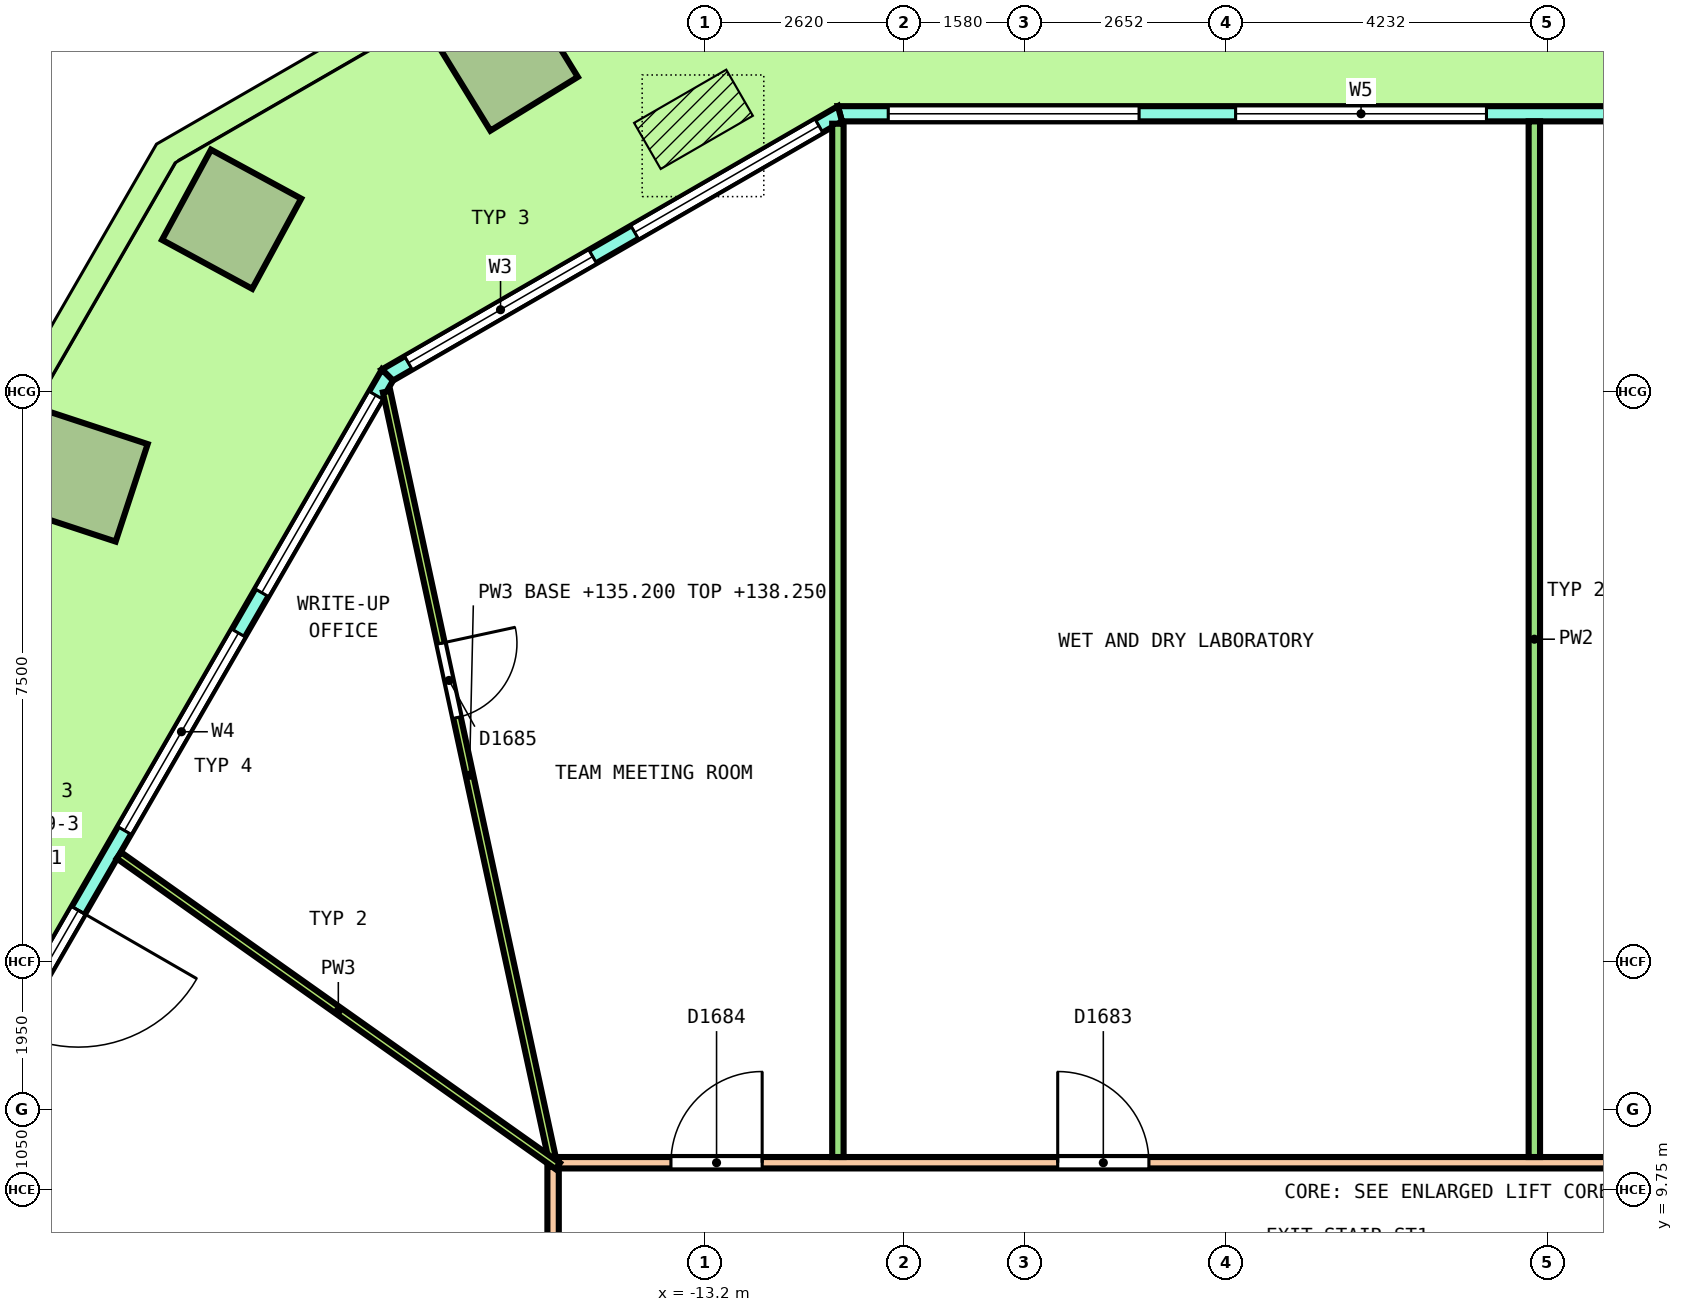
"""IFC4 building model, lengths in metres.
Left out: names, types, materials, properties, quantities, classifications, styles, units other than length and angle.
Written with IfcOpenShell. Run it as: python <this file> out.ifc"""

import sys

from ifc_helpers import new_model, si_unit, direction, frame, frame_2d, origin, origin_2d, place, context, subcontext, project, spatial, polyline, rectangle, outline, extrude, element, fill, save


model = new_model("IFC4")
c1 = context("Model", 3, precision=1e-05, world=origin(), true_north=direction((0.0, 1.0)))
c2 = subcontext(c1, "Body", "Model", "MODEL_VIEW")
j1 = project(units=[si_unit("LENGTHUNIT", "METRE"), si_unit("PLANEANGLEUNIT", "RADIAN")], contexts=[c1])
p1 = place(None, origin())
s1 = spatial("IfcSite", under=j1, at=p1, CompositionType="ELEMENT")
p2 = place(p1, origin())
s2 = spatial("IfcBuilding", under=s1, at=p2, CompositionType="ELEMENT")
p3 = place(p2, frame((0.0, 0.0, 135.2)))
s3 = spatial("IfcBuildingStorey", under=s2, at=p3, CompositionType="ELEMENT", Elevation=135.2)
for number, where, z_axis, x_axis in (
    (1, (-15.803, 24.606, 0.0), (0.341, 0.0, 0.94), (-0.801, -0.523, 0.291)),
    (2, (-19.43, 22.512, 0.0), (0.341, 0.0, 0.94), (-0.448, -0.879, 0.163)),
):
    element("IfcColumn", number, at=place(p3, frame(where, z_axis=z_axis, x_axis=x_axis)), inside=s3, PredefinedType="COLUMN", context=c2, shape_type="SweptSolid", body=[
        extrude(rectangle(XDim=1.35, YDim=1.35, at=origin_2d()), origin(), (0.0, 0.0, 1.0), 4.298),
    ])
p4 = place(p3, frame((-21.386, 19.124, 0.0), z_axis=(0.309930766279, -0.059635152069, 0.948887015799), x_axis=(-0.470498954611, -0.8768780975, 0.098567417711)))
e3 = element("IfcColumn", 3, at=p4, inside=s3, PredefinedType="COLUMN", context=c2, shape_type="SweptSolid", body=[
    extrude(rectangle(XDim=1.35, YDim=1.35, at=origin_2d()), origin(), (0.0, 0.0, 1.0), 4.258),
])
p5 = place(p3, frame((-23.342, 15.736, 0.0), z_axis=(0.276787116882, -0.119841216302, 0.953429061233), x_axis=(-0.49068194142, -0.870713478182, 0.033004109981)))
e4 = element("IfcColumn", 4, at=p5, inside=s3, PredefinedType="COLUMN", context=c2, shape_type="SweptSolid", body=[
    extrude(rectangle(XDim=1.35, YDim=1.35, at=origin_2d()), origin(), (0.0, 0.0, 1.0), 4.237),
])
p6 = place(p3, frame((11.426, 23.9, 0.0), z_axis=(0.0, 0.0, 1.0), x_axis=(-1.0, 0.0, 0.0)))
e5 = element("IfcWall", 5, at=p6, inside=s3, PredefinedType="SOLIDWALL", context=c2, shape_type="SweptSolid", body=[
    extrude(outline(polyline([(-0.027, -0.1), (1.014, -0.1), (2.055, -0.1), (3.097, -0.1), (4.138, -0.1), (5.179, -0.1), (6.22, -0.1), (7.261, -0.1), (8.303, -0.1), (9.344, -0.1), (10.385, -0.1), (11.426, -0.1), (12.468, -0.1), (13.509, -0.1), (14.55, -0.1), (15.591, -0.1), (16.632, -0.1), (17.673, -0.1), (18.715, -0.1), (19.756, -0.1), (20.797, -0.1), (21.838, -0.1), (22.879, -0.1), (22.826, 0.1), (21.789, 0.1), (20.753, 0.1), (19.717, 0.1), (18.68, 0.1), (17.644, 0.1), (16.608, 0.1), (15.572, 0.1), (14.535, 0.1), (13.499, 0.1), (12.463, 0.1), (11.426, 0.1), (10.39, 0.1), (9.354, 0.1), (8.317, 0.1), (7.281, 0.1), (6.245, 0.1), (5.208, 0.1), (4.172, 0.1), (3.136, 0.1), (2.099, 0.1), (1.063, 0.1), (0.027, 0.1), (-0.027, -0.1)])), origin(), (0.0, 0.0, 1.0), 4.1),
])
p7 = place(p6, frame((0.635, 0.0, 0.1)))
e6 = element("IfcOpeningElement", 6, at=p7, cuts=e5, PredefinedType="OPENING", context=c2, shape_type="SweptSolid", body=[
    extrude(rectangle(XDim=3.3, YDim=2.9, at=frame_2d((1.65, 1.45))), frame((0.0, 0.11, 0.0), z_axis=(0.0, -1.0, 0.0), x_axis=(1.0, 0.0, 0.0)), (0.0, 0.0, 1.0), 0.22),
])
p8 = place(p6, frame((5.206, 0.0, 0.1)))
e7 = element("IfcOpeningElement", 7, at=p8, cuts=e5, PredefinedType="OPENING", context=c2, shape_type="SweptSolid", body=[
    extrude(rectangle(XDim=3.3, YDim=2.9, at=frame_2d((1.65, 1.45))), frame((0.0, 0.11, 0.0), z_axis=(0.0, -1.0, 0.0), x_axis=(1.0, 0.0, 0.0)), (0.0, 0.0, 1.0), 0.22),
])
p9 = place(p6, frame((10.526, 0.0, 0.0)))
e8 = element("IfcOpeningElement", 8, at=p9, cuts=e5, PredefinedType="OPENING", context=c2, shape_type="SweptSolid", body=[
    extrude(rectangle(XDim=1.8, YDim=2.4, at=frame_2d((0.9, 1.2))), frame((0.0, 0.11, 0.0), z_axis=(0.0, -1.0, 0.0), x_axis=(1.0, 0.0, 0.0)), (0.0, 0.0, 1.0), 0.22),
])
p10 = place(p6, frame((10.526, 0.0, 2.55)))
e9 = element("IfcOpeningElement", 9, at=p10, cuts=e5, PredefinedType="OPENING", context=c2, shape_type="SweptSolid", body=[
    extrude(rectangle(XDim=1.8, YDim=0.45, at=frame_2d((0.9, 0.225))), frame((0.0, 0.11, 0.0), z_axis=(0.0, -1.0, 0.0), x_axis=(1.0, 0.0, 0.0)), (0.0, 0.0, 1.0), 0.22),
])
p11 = place(p6, frame((14.347, 0.0, 0.1)))
e10 = element("IfcOpeningElement", 10, at=p11, cuts=e5, PredefinedType="OPENING", context=c2, shape_type="SweptSolid", body=[
    extrude(rectangle(XDim=3.3, YDim=2.9, at=frame_2d((1.65, 1.45))), frame((0.0, 0.11, 0.0), z_axis=(0.0, -1.0, 0.0), x_axis=(1.0, 0.0, 0.0)), (0.0, 0.0, 1.0), 0.22),
])
p12 = place(p6, frame((18.917, 0.0, 0.1)))
e11 = element("IfcOpeningElement", 11, at=p12, cuts=e5, PredefinedType="OPENING", context=c2, shape_type="SweptSolid", body=[
    extrude(rectangle(XDim=3.3, YDim=2.9, at=frame_2d((1.65, 1.45))), frame((0.0, 0.11, 0.0), z_axis=(0.0, -1.0, 0.0), x_axis=(1.0, 0.0, 0.0)), (0.0, 0.0, 1.0), 0.22),
])
p13 = place(p3, frame((-11.426, 23.9, 0.0), z_axis=(0.0, 0.0, 1.0), x_axis=(-0.866029458321, -0.49999297727, 0.0)))
e12 = element("IfcWall", 12, at=p13, inside=s3, PredefinedType="SOLIDWALL", context=c2, shape_type="SweptSolid", body=[
    extrude(outline(polyline([(-0.027, -0.1), (1.128, -0.1), (2.282, -0.1), (3.437, -0.1), (4.592, -0.1), (5.747, -0.1), (6.901, -0.1), (6.848, 0.1), (5.711, 0.1), (4.574, 0.1), (3.437, 0.1), (2.301, 0.1), (1.164, 0.1), (0.027, 0.1), (-0.027, -0.1)])), origin(), (0.0, 0.0, 1.0), 4.1),
])
p14 = place(p13, frame((0.319, 0.0, 0.1)))
e13 = element("IfcOpeningElement", 13, at=p14, cuts=e12, PredefinedType="OPENING", context=c2, shape_type="SweptSolid", body=[
    extrude(rectangle(XDim=2.8, YDim=2.9, at=frame_2d((1.4, 1.45))), frame((0.0, 0.11, 0.0), z_axis=(0.0, -1.0, 0.0), x_axis=(1.0, 0.0, 0.0)), (0.0, 0.0, 1.0), 0.22),
])
p15 = place(p13, frame((3.756, 0.0, 0.1)))
e14 = element("IfcOpeningElement", 14, at=p15, cuts=e12, PredefinedType="OPENING", context=c2, shape_type="SweptSolid", body=[
    extrude(rectangle(XDim=2.8, YDim=2.9, at=frame_2d((1.4, 1.45))), frame((0.0, 0.11, 0.0), z_axis=(0.0, -1.0, 0.0), x_axis=(1.0, 0.0, 0.0)), (0.0, 0.0, 1.0), 0.22),
])
p16 = place(p3, frame((-17.38, 20.463, 0.0), z_axis=(0.0, 0.0, 1.0), x_axis=(-0.500000137386, -0.866025324465, 0.0)))
e15 = element("IfcWall", 15, at=p16, inside=s3, PredefinedType="SOLIDWALL", context=c2, shape_type="SweptSolid", body=[
    extrude(outline(polyline([(-0.027, -0.1), (0.979, -0.1), (1.986, -0.1), (2.992, -0.1), (3.999, -0.1), (5.005, -0.1), (6.012, -0.1), (7.018, -0.1), (8.025, -0.1), (9.031, -0.1), (10.038, -0.1), (11.044, -0.1), (12.051, -0.1), (13.057, -0.1), (14.063, -0.1), (15.07, -0.1), (16.076, -0.1), (17.083, -0.1), (18.089, -0.1), (18.036, 0.1), (17.035, 0.1), (16.035, 0.1), (15.034, 0.1), (14.034, 0.1), (13.033, 0.1), (12.033, 0.1), (11.032, 0.1), (10.032, 0.1), (9.031, 0.1), (8.031, 0.1), (7.03, 0.1), (6.03, 0.1), (5.029, 0.1), (4.029, 0.1), (3.028, 0.1), (2.028, 0.1), (1.027, 0.1), (0.027, 0.1), (-0.027, -0.1)])), origin(), (0.0, 0.0, 1.0), 4.1),
])
p17 = place(p16, frame((0.306, 0.0, 0.1)))
e16 = element("IfcOpeningElement", 16, at=p17, cuts=e15, PredefinedType="OPENING", context=c2, shape_type="SweptSolid", body=[
    extrude(rectangle(XDim=3.0, YDim=2.9, at=frame_2d((1.5, 1.45))), frame((0.0, 0.11, 0.0), z_axis=(0.0, -1.0, 0.0), x_axis=(1.0, 0.0, 0.0)), (0.0, 0.0, 1.0), 0.22),
])
p18 = place(p16, frame((3.919, 0.0, 0.1)))
e17 = element("IfcOpeningElement", 17, at=p18, cuts=e15, PredefinedType="OPENING", context=c2, shape_type="SweptSolid", body=[
    extrude(rectangle(XDim=3.0, YDim=2.9, at=frame_2d((1.5, 1.45))), frame((0.0, 0.11, 0.0), z_axis=(0.0, -1.0, 0.0), x_axis=(1.0, 0.0, 0.0)), (0.0, 0.0, 1.0), 0.22),
])
p19 = place(p16, frame((8.131, 0.0, 0.0)))
e18 = element("IfcOpeningElement", 18, at=p19, cuts=e15, PredefinedType="OPENING", context=c2, shape_type="SweptSolid", body=[
    extrude(rectangle(XDim=1.8, YDim=2.4, at=frame_2d((0.9, 1.2))), frame((0.0, 0.11, 0.0), z_axis=(0.0, -1.0, 0.0), x_axis=(1.0, 0.0, 0.0)), (0.0, 0.0, 1.0), 0.22),
])
p20 = place(p16, frame((8.131, 0.0, 2.55)))
e19 = element("IfcOpeningElement", 19, at=p20, cuts=e15, PredefinedType="OPENING", context=c2, shape_type="SweptSolid", body=[
    extrude(rectangle(XDim=1.8, YDim=0.45, at=frame_2d((0.9, 0.225))), frame((0.0, 0.11, 0.0), z_axis=(0.0, -1.0, 0.0), x_axis=(1.0, 0.0, 0.0)), (0.0, 0.0, 1.0), 0.22),
])
p21 = place(p16, frame((11.144, 0.0, 0.1)))
e20 = element("IfcOpeningElement", 20, at=p21, cuts=e15, PredefinedType="OPENING", context=c2, shape_type="SweptSolid", body=[
    extrude(rectangle(XDim=3.0, YDim=2.9, at=frame_2d((1.5, 1.45))), frame((0.0, 0.11, 0.0), z_axis=(0.0, -1.0, 0.0), x_axis=(1.0, 0.0, 0.0)), (0.0, 0.0, 1.0), 0.22),
])
p22 = place(p16, frame((14.756, 0.0, 0.1)))
e21 = element("IfcOpeningElement", 21, at=p22, cuts=e15, PredefinedType="OPENING", context=c2, shape_type="SweptSolid", body=[
    extrude(rectangle(XDim=3.0, YDim=2.9, at=frame_2d((1.5, 1.45))), frame((0.0, 0.11, 0.0), z_axis=(0.0, -1.0, 0.0), x_axis=(1.0, 0.0, 0.0)), (0.0, 0.0, 1.0), 0.22),
])
p23 = place(p3, frame((-15.125, 10.1, 0.0), z_axis=(0.0, 0.0, 1.0), x_axis=(1.0, 0.0, 0.0)))
e22 = element("IfcWall", 22, at=p23, inside=s3, PredefinedType="PARTITIONING", context=c2, shape_type="SweptSolid", body=[
    extrude(rectangle(XDim=30.25, YDim=0.15, at=frame_2d((15.125, 0.0))), origin(), (0.0, 0.0, 1.0), 3.05),
])
p24 = place(p23, frame((16.895, 0.0, 0.0)))
e23 = element("IfcOpeningElement", 23, at=p24, cuts=e22, PredefinedType="OPENING", context=c2, shape_type="SweptSolid", body=[
    extrude(rectangle(XDim=1.2, YDim=2.1, at=frame_2d((0.6, 1.05))), frame((0.0, 0.085, 0.0), z_axis=(0.0, -1.0, 0.0), x_axis=(1.0, 0.0, 0.0)), (0.0, 0.0, 1.0), 0.17),
])
p25 = place(p23, frame((6.564, 0.0, 0.0)))
e24 = element("IfcOpeningElement", 24, at=p25, cuts=e22, PredefinedType="OPENING", context=c2, shape_type="SweptSolid", body=[
    extrude(rectangle(XDim=1.2, YDim=2.1, at=frame_2d((0.6, 1.05))), frame((0.0, 0.085, 0.0), z_axis=(0.0, -1.0, 0.0), x_axis=(1.0, 0.0, 0.0)), (0.0, 0.0, 1.0), 0.17),
])
p26 = place(p23, frame((1.476, 0.0, 0.0)))
e25 = element("IfcOpeningElement", 25, at=p26, cuts=e22, PredefinedType="OPENING", context=c2, shape_type="SweptSolid", body=[
    extrude(rectangle(XDim=1.2, YDim=2.1, at=frame_2d((0.6, 1.05))), frame((0.0, 0.085, 0.0), z_axis=(0.0, -1.0, 0.0), x_axis=(1.0, 0.0, 0.0)), (0.0, 0.0, 1.0), 0.17),
])
p27 = place(p3, frame((-15.2, 0.426, 0.0), z_axis=(0.0, 0.0, 1.0), x_axis=(0.0, 1.0, 0.0)))
e26 = element("IfcWall", 26, at=p27, inside=s3, PredefinedType="PARTITIONING", context=c2, shape_type="SweptSolid", body=[
    extrude(rectangle(XDim=9.624, YDim=0.15, at=frame_2d((4.812, 0.0))), origin(), (0.0, 0.0, 1.0), 3.05),
])
p28 = place(p27, frame((6.951, 0.0, 0.0)))
e27 = element("IfcOpeningElement", 27, at=p28, cuts=e26, PredefinedType="OPENING", context=c2, shape_type="SweptSolid", body=[
    extrude(rectangle(XDim=1.2, YDim=2.1, at=frame_2d((0.6, 1.05))), frame((0.0, 0.085, 0.0), z_axis=(0.0, -1.0, 0.0), x_axis=(1.0, 0.0, 0.0)), (0.0, 0.0, 1.0), 0.17),
])
p29 = place(p3, frame((-2.291, 10.175, 0.0), z_axis=(0.0, 0.0, 1.0), x_axis=(0.0, 1.0, 0.0)))
e28 = element("IfcWall", 28, at=p29, inside=s3, PredefinedType="PARTITIONING", context=c2, shape_type="SweptSolid", body=[
    extrude(rectangle(XDim=13.625, YDim=0.15, at=frame_2d((6.812, 0.0))), origin(), (0.0, 0.0, 1.0), 3.05),
])
p30 = place(p3, frame((-11.453, 10.175, 0.0), z_axis=(0.0, 0.0, 1.0), x_axis=(0.0, 1.0, 0.0)))
e29 = element("IfcWall", 29, at=p30, inside=s3, PredefinedType="PARTITIONING", context=c2, shape_type="SweptSolid", body=[
    extrude(rectangle(XDim=13.594, YDim=0.15, at=frame_2d((6.797, 0.0))), origin(), (0.0, 0.0, 1.0), 3.05),
])
p31 = place(p3, frame((-17.39, 20.245, 0.0), z_axis=(0.0, 0.0, 1.0), x_axis=(0.211012362952, -0.977483392535, 0.0)))
e30 = element("IfcWall", 30, at=p31, inside=s3, PredefinedType="PARTITIONING", context=c2, shape_type="SweptSolid", body=[
    extrude(rectangle(XDim=10.329, YDim=0.1, at=frame_2d((5.164, 0.0))), origin(), (0.0, 0.0, 1.0), 3.05),
])
p32 = place(p31, frame((3.387, 0.0, 0.0)))
e31 = element("IfcOpeningElement", 31, at=p32, cuts=e30, PredefinedType="OPENING", context=c2, shape_type="SweptSolid", body=[
    extrude(rectangle(XDim=1.0, YDim=2.1, at=frame_2d((0.5, 1.05))), frame((0.0, 0.06, 0.0), z_axis=(0.0, -1.0, 0.0), x_axis=(1.0, 0.0, 0.0)), (0.0, 0.0, 1.0), 0.12),
])
p33 = place(p3, frame((-20.912, 14.144, 0.0), z_axis=(0.0, 0.0, 1.0), x_axis=(0.816149265307, -0.577841134516, 0.0)))
e32 = element("IfcWall", 32, at=p33, inside=s3, PredefinedType="PARTITIONING", context=c2, shape_type="SweptSolid", body=[
    extrude(rectangle(XDim=7.074, YDim=0.1, at=frame_2d((3.537, 0.0))), origin(), (0.0, 0.0, 1.0), 3.05),
])
p34 = place(p11, origin())
e33 = element("IfcWindow", 33, at=p34, inside=s3, PartitioningType="SINGLE_PANEL", PredefinedType="WINDOW", context=c2, shape_type="SweptSolid", body=[
    extrude(rectangle(XDim=3.3, YDim=2.9, at=frame_2d((1.65, 1.45))), frame((0.0, 0.03, 0.0), z_axis=(0.0, -1.0, 0.0), x_axis=(1.0, 0.0, 0.0)), (0.0, 0.0, 1.0), 0.06),
])
fill(e10, e33)
p35 = place(p12, origin())
e34 = element("IfcWindow", 34, at=p35, inside=s3, PartitioningType="SINGLE_PANEL", PredefinedType="WINDOW", context=c2, shape_type="SweptSolid", body=[
    extrude(rectangle(XDim=3.3, YDim=2.9, at=frame_2d((1.65, 1.45))), frame((0.0, 0.03, 0.0), z_axis=(0.0, -1.0, 0.0), x_axis=(1.0, 0.0, 0.0)), (0.0, 0.0, 1.0), 0.06),
])
fill(e11, e34)
p36 = place(p14, origin())
e35 = element("IfcWindow", 35, at=p36, inside=s3, PartitioningType="SINGLE_PANEL", PredefinedType="WINDOW", context=c2, shape_type="SweptSolid", body=[
    extrude(rectangle(XDim=2.8, YDim=2.9, at=frame_2d((1.4, 1.45))), frame((0.0, 0.03, 0.0), z_axis=(0.0, -1.0, 0.0), x_axis=(1.0, 0.0, 0.0)), (0.0, 0.0, 1.0), 0.06),
])
fill(e13, e35)
p37 = place(p15, origin())
e36 = element("IfcWindow", 36, at=p37, inside=s3, PartitioningType="SINGLE_PANEL", PredefinedType="WINDOW", context=c2, shape_type="SweptSolid", body=[
    extrude(rectangle(XDim=2.8, YDim=2.9, at=frame_2d((1.4, 1.45))), frame((0.0, 0.03, 0.0), z_axis=(0.0, -1.0, 0.0), x_axis=(1.0, 0.0, 0.0)), (0.0, 0.0, 1.0), 0.06),
])
fill(e14, e36)
p38 = place(p17, origin())
e37 = element("IfcWindow", 37, at=p38, inside=s3, PartitioningType="SINGLE_PANEL", PredefinedType="WINDOW", context=c2, shape_type="SweptSolid", body=[
    extrude(rectangle(XDim=3.0, YDim=2.9, at=frame_2d((1.5, 1.45))), frame((0.0, 0.03, 0.0), z_axis=(0.0, -1.0, 0.0), x_axis=(1.0, 0.0, 0.0)), (0.0, 0.0, 1.0), 0.06),
])
fill(e16, e37)
p39 = place(p18, origin())
e38 = element("IfcWindow", 38, at=p39, inside=s3, PartitioningType="SINGLE_PANEL", PredefinedType="WINDOW", context=c2, shape_type="SweptSolid", body=[
    extrude(rectangle(XDim=3.0, YDim=2.9, at=frame_2d((1.5, 1.45))), frame((0.0, 0.03, 0.0), z_axis=(0.0, -1.0, 0.0), x_axis=(1.0, 0.0, 0.0)), (0.0, 0.0, 1.0), 0.06),
])
fill(e17, e38)
p40 = place(p19, origin())
e39 = element("IfcDoor", 39, at=p40, inside=s3, OperationType="DOUBLE_DOOR_SINGLE_SWING", PredefinedType="DOOR", context=c2, shape_type="SweptSolid", body=[
    extrude(rectangle(XDim=1.8, YDim=2.4, at=frame_2d((0.9, 1.2))), frame((0.0, 0.025, 0.0), z_axis=(0.0, -1.0, 0.0), x_axis=(1.0, 0.0, 0.0)), (0.0, 0.0, 1.0), 0.05),
])
fill(e18, e39)
p41 = place(p20, origin())
e40 = element("IfcWindow", 40, at=p41, inside=s3, PartitioningType="SINGLE_PANEL", PredefinedType="WINDOW", context=c2, shape_type="SweptSolid", body=[
    extrude(rectangle(XDim=1.8, YDim=0.45, at=frame_2d((0.9, 0.225))), frame((0.0, 0.03, 0.0), z_axis=(0.0, -1.0, 0.0), x_axis=(1.0, 0.0, 0.0)), (0.0, 0.0, 1.0), 0.06),
])
fill(e19, e40)
p42 = place(p25, origin())
e41 = element("IfcDoor", 41, at=p42, inside=s3, OperationType="DOUBLE_DOOR_SINGLE_SWING", PredefinedType="DOOR", context=c2, shape_type="SweptSolid", body=[
    extrude(rectangle(XDim=1.2, YDim=2.1, at=frame_2d((0.6, 1.05))), frame((0.0, 0.025, 0.0), z_axis=(0.0, -1.0, 0.0), x_axis=(1.0, 0.0, 0.0)), (0.0, 0.0, 1.0), 0.05),
])
fill(e24, e41)
p43 = place(p26, origin())
e42 = element("IfcDoor", 42, at=p43, inside=s3, OperationType="DOUBLE_DOOR_SINGLE_SWING", PredefinedType="DOOR", context=c2, shape_type="SweptSolid", body=[
    extrude(rectangle(XDim=1.2, YDim=2.1, at=frame_2d((0.6, 1.05))), frame((0.0, 0.025, 0.0), z_axis=(0.0, -1.0, 0.0), x_axis=(1.0, 0.0, 0.0)), (0.0, 0.0, 1.0), 0.05),
])
fill(e25, e42)
p44 = place(p32, origin())
e43 = element("IfcDoor", 43, at=p44, inside=s3, OperationType="SINGLE_SWING_RIGHT", PredefinedType="DOOR", context=c2, shape_type="SweptSolid", body=[
    extrude(rectangle(XDim=1.0, YDim=2.1, at=frame_2d((0.5, 1.05))), frame((0.0, 0.025, 0.0), z_axis=(0.0, -1.0, 0.0), x_axis=(1.0, 0.0, 0.0)), (0.0, 0.0, 1.0), 0.05),
])
fill(e31, e43)
save(model, sys.argv[1])
